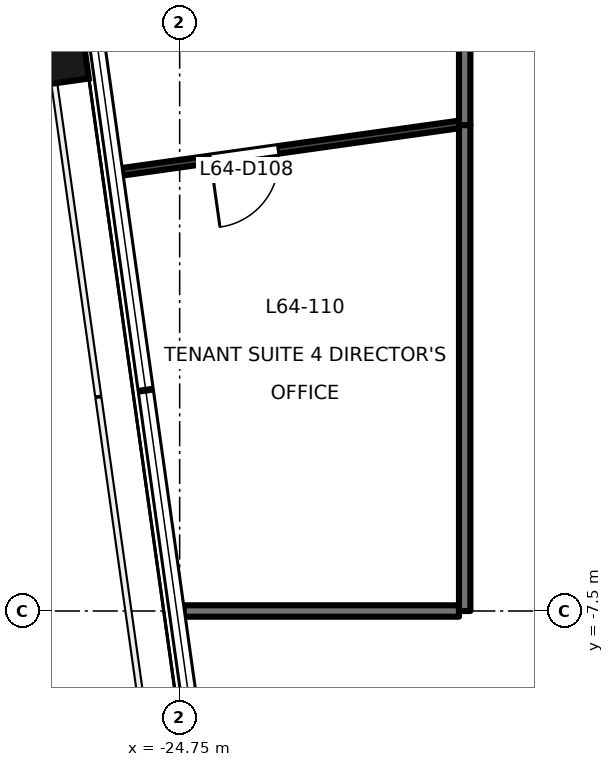
"""IFC4 building model, lengths in metres.
Left out: names, types, materials, properties, quantities, classifications, styles, units other than length and angle.
Written with IfcOpenShell. Run it as: python <this file> out.ifc"""

import sys

from ifc_helpers import new_model, si_unit, direction, frame, frame_2d, origin, origin_2d, place, context, subcontext, project, spatial, rectangle, extrude, element, fill, save


model = new_model("IFC4")
c1 = context("Model", 3, precision=1e-05, world=origin(), true_north=direction((0.0, 1.0)))
c2 = subcontext(c1, "Body", "Model", "MODEL_VIEW")
j1 = project(units=[si_unit("LENGTHUNIT", "METRE"), si_unit("PLANEANGLEUNIT", "RADIAN")], contexts=[c1])
p1 = place(None, origin())
s1 = spatial("IfcSite", under=j1, at=p1, CompositionType="ELEMENT")
p2 = place(p1, origin())
s2 = spatial("IfcBuilding", under=s1, at=p2, CompositionType="ELEMENT")
p3 = place(p2, frame((0.0, 0.0, 278.5)))
s3 = spatial("IfcBuildingStorey", under=s2, at=p3, CompositionType="ELEMENT", Elevation=278.5)
p4 = place(p3, frame((-26.906, -0.125, -0.2), z_axis=(0.0, 0.0, 1.0), x_axis=(-0.139190384377, 0.990265639562, 0.0)))
e1 = element("IfcColumn", 1, at=p4, inside=s3, PredefinedType="COLUMN", context=c2, shape_type="SweptSolid", body=[
    extrude(rectangle(XDim=1.0, YDim=1.8, at=origin_2d()), origin(), (0.0, 0.0, 1.0), 3.9),
])
p5 = place(p3, frame((-21.0, -1.108, 0.0), z_axis=(0.0, 0.0, 1.0), x_axis=(0.0, 1.0, 0.0)))
e2 = element("IfcWall", 2, at=p5, inside=s3, PredefinedType="PARTITIONING", context=c2, shape_type="SweptSolid", body=[
    extrude(rectangle(XDim=6.608, YDim=0.15, at=frame_2d((3.304, 0.0))), origin(), (0.0, 0.0, 1.0), 3.3),
])
p6 = place(p5, frame((3.706, 0.0, 0.0)))
e3 = element("IfcOpeningElement", 3, at=p6, cuts=e2, PredefinedType="OPENING", context=c2, shape_type="SweptSolid", body=[
    extrude(rectangle(XDim=1.5, YDim=2.1, at=frame_2d((0.75, 1.05))), frame((0.0, 0.085, 0.0), z_axis=(0.0, -1.0, 0.0), x_axis=(1.0, 0.0, 0.0)), (0.0, 0.0, 1.0), 0.171),
])
p7 = place(p3, frame((-24.696, -7.5, 0.0), z_axis=(0.0, 0.0, 1.0), x_axis=(1.0, 0.0, 0.0)))
e4 = element("IfcWall", 4, at=p7, inside=s3, PredefinedType="PARTITIONING", context=c2, shape_type="SweptSolid", body=[
    extrude(rectangle(XDim=3.621, YDim=0.15, at=frame_2d((1.811, 0.0))), origin(), (0.0, 0.0, 1.0), 3.7),
])
p8 = place(p3, frame((-21.0, -7.5, 0.0), z_axis=(0.0, 0.0, 1.0), x_axis=(0.0, 1.0, 0.0)))
e5 = element("IfcWall", 5, at=p8, inside=s3, PredefinedType="PARTITIONING", context=c2, shape_type="SweptSolid", body=[
    extrude(rectangle(XDim=6.392, YDim=0.15, at=frame_2d((3.196, 0.0))), origin(), (0.0, 0.0, 1.0), 3.3),
])
p9 = place(p3, frame((-21.068, -1.098, 0.0), z_axis=(0.0, 0.0, 1.0), x_axis=(-0.990271353113, -0.139149729442, 0.0)))
e6 = element("IfcWall", 6, at=p9, inside=s3, PredefinedType="PARTITIONING", context=c2, shape_type="SweptSolid", body=[
    extrude(rectangle(XDim=4.485, YDim=0.1, at=frame_2d((2.242, 0.0))), origin(), (0.0, 0.0, 1.0), 3.7),
])
p10 = place(p9, frame((2.409, 0.0, 0.0)))
e7 = element("IfcOpeningElement", 7, at=p10, cuts=e6, PredefinedType="OPENING", context=c2, shape_type="SweptSolid", body=[
    extrude(rectangle(XDim=0.9, YDim=2.1, at=frame_2d((0.45, 1.05))), frame((0.0, 0.061, 0.0), z_axis=(0.0, -1.0, 0.0), x_axis=(1.0, 0.0, 0.0)), (0.0, 0.0, 1.0), 0.121),
])
p11 = place(p10, origin())
e8 = element("IfcDoor", 8, at=p11, inside=s3, OperationType="SINGLE_SWING_RIGHT", PredefinedType="DOOR", context=c2, shape_type="SweptSolid", body=[
    extrude(rectangle(XDim=0.9, YDim=2.1, at=frame_2d((0.45, 1.05))), frame((0.0, 0.025, 0.0), z_axis=(0.0, -1.0, 0.0), x_axis=(1.0, 0.0, 0.0)), (0.0, 0.0, 1.0), 0.05),
])
fill(e7, e8)
save(model, sys.argv[1])
